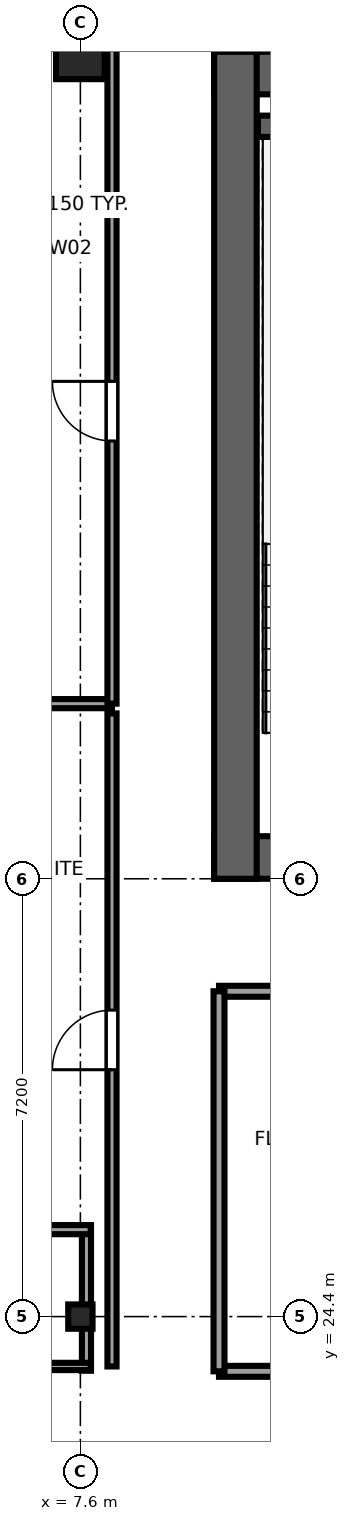
"""IFC4 building model, lengths in metres.
Left out: names, types, materials, properties, quantities, classifications, styles, units other than length and angle.
Written with IfcOpenShell. Run it as: python <this file> out.ifc"""

import sys

from ifc_helpers import new_model, si_unit, direction, frame, frame_2d, origin, origin_2d, place, context, subcontext, project, spatial, rectangle, i_section, extrude, source, transform, mapped, element, fill, save


model = new_model("IFC4")
c1 = context("Model", 3, precision=1e-05, world=origin(), true_north=direction((0.0, 1.0)))
c2 = subcontext(c1, "Body", "Model", "MODEL_VIEW")
j1 = project(units=[si_unit("LENGTHUNIT", "METRE"), si_unit("PLANEANGLEUNIT", "RADIAN")], contexts=[c1])
p1 = place(None, origin())
s1 = spatial("IfcSite", under=j1, at=p1, CompositionType="ELEMENT")
p2 = place(p1, origin())
s2 = spatial("IfcBuilding", under=s1, at=p2, CompositionType="ELEMENT")
p3 = place(p2, frame((0.0, 0.0, 150.6)))
s3 = spatial("IfcBuildingStorey", under=s2, at=p3, CompositionType="ELEMENT", Elevation=150.6)
p4 = place(p3, frame((9.8, 31.95, 0.0), z_axis=(0.0, 0.0, 1.0), x_axis=(1.0, 0.0, 0.0)))
e1 = element("IfcWall", 1, at=p4, inside=s3, PredefinedType="SHEAR", context=c2, shape_type="SweptSolid", body=[
    extrude(rectangle(XDim=26.4, YDim=0.7, at=frame_2d((13.2, 0.0))), origin(), (0.0, 0.0, 1.0), 3.55),
])
p5 = place(p4, frame((7.65, 0.0, 0.0), z_axis=(0.0, 0.0, 1.0), x_axis=(-1.0, 0.0, 0.0)))
e2 = element("IfcOpeningElement", 2, at=p5, cuts=e1, PredefinedType="OPENING", context=c2, shape_type="SweptSolid", body=[
    extrude(rectangle(XDim=1.5, YDim=2.04, at=frame_2d((0.75, 1.02))), frame((0.0, 0.36, 0.0), z_axis=(0.0, -1.0, 0.0), x_axis=(1.0, 0.0, 0.0)), (0.0, 0.0, 1.0), 0.72),
])
p6 = place(p4, frame((13.95, 0.0, 0.0), z_axis=(0.0, 0.0, 1.0), x_axis=(-1.0, 0.0, 0.0)))
e3 = element("IfcOpeningElement", 3, at=p6, cuts=e1, PredefinedType="OPENING", context=c2, shape_type="SweptSolid", body=[
    extrude(rectangle(XDim=1.5, YDim=2.04, at=frame_2d((0.75, 1.02))), frame((0.0, 0.36, 0.0), z_axis=(0.0, -1.0, 0.0), x_axis=(1.0, 0.0, 0.0)), (0.0, 0.0, 1.0), 0.72),
])
p7 = place(p4, frame((20.25, 0.0, 0.0), z_axis=(0.0, 0.0, 1.0), x_axis=(-1.0, 0.0, 0.0)))
e4 = element("IfcOpeningElement", 4, at=p7, cuts=e1, PredefinedType="OPENING", context=c2, shape_type="SweptSolid", body=[
    extrude(rectangle(XDim=1.5, YDim=2.04, at=frame_2d((0.75, 1.02))), frame((0.0, 0.36, 0.0), z_axis=(0.0, -1.0, 0.0), x_axis=(1.0, 0.0, 0.0)), (0.0, 0.0, 1.0), 0.72),
])
p8 = place(p3, frame((9.8, 44.85, 0.0), z_axis=(0.0, 0.0, 1.0), x_axis=(1.0, 0.0, 0.0)))
e5 = element("IfcWall", 5, at=p8, inside=s3, PredefinedType="SHEAR", context=c2, shape_type="SweptSolid", body=[
    extrude(rectangle(XDim=26.4, YDim=0.7, at=frame_2d((13.2, 0.0))), origin(), (0.0, 0.0, 1.0), 3.55),
])
p9 = place(p3, frame((10.15, 31.6, 0.0), z_axis=(0.0, 0.0, 1.0), x_axis=(0.0, 1.0, 0.0)))
e6 = element("IfcWall", 6, at=p9, inside=s3, PredefinedType="SHEAR", context=c2, shape_type="SweptSolid", body=[
    extrude(rectangle(XDim=13.6, YDim=0.7, at=frame_2d((6.8, 0.0))), origin(), (0.0, 0.0, 1.0), 3.55),
])
p10 = place(p3, frame((10.52, 43.975, 0.0), z_axis=(0.0, 0.0, 1.0), x_axis=(1.0, 0.0, 0.0)))
e7 = element("IfcWall", 7, at=p10, inside=s3, PredefinedType="SHEAR", context=c2, shape_type="SweptSolid", body=[
    extrude(rectangle(XDim=3.6, YDim=0.35, at=frame_2d((1.8, 0.0))), origin(), (0.0, 0.0, 1.0), 3.55),
])
m1 = source(origin(), c2, "Body", "SweptSolid", [
    extrude(i_section(OverallWidth=0.4, OverallDepth=0.4, WebThickness=0.02, FlangeThickness=0.035, at=origin_2d()), origin(), (0.0, 0.0, 1.0), 3.55),
])
p11 = place(p3, frame((7.6, 24.4, 0.0), z_axis=(0.0, 0.0, 1.0), x_axis=(1.0, 0.0, 0.0)))
e8 = element("IfcColumn", 8, at=p11, inside=s3, PredefinedType="COLUMN", context=c2, shape_type="MappedRepresentation", body=[
    mapped(m1, transform((0.0, 0.0, 0.0), x_axis=(1.0, 0.0, 0.0), y_axis=(0.0, 1.0, 0.0), z_axis=(0.0, 0.0, 1.0), scale=1.0)),
])
m2 = source(origin(), c2, "Body", "SweptSolid", [
    extrude(rectangle(XDim=0.8, YDim=0.8, at=origin_2d()), origin(), (0.0, 0.0, 1.0), 3.55),
])
p12 = place(p3, frame((7.6, 45.15, 0.0), z_axis=(0.0, 0.0, 1.0), x_axis=(1.0, 0.0, 0.0)))
e9 = element("IfcColumn", 9, at=p12, inside=s3, PredefinedType="COLUMN", context=c2, shape_type="MappedRepresentation", body=[
    mapped(m2, transform((0.0, 0.0, 0.0), x_axis=(1.0, 0.0, 0.0), y_axis=(0.0, 1.0, 0.0), z_axis=(0.0, 0.0, 1.0), scale=1.0)),
])
p13 = place(p3, frame((7.7, 23.51, 0.0), z_axis=(0.0, 0.0, 1.0), x_axis=(0.0, 1.0, 0.0)))
e10 = element("IfcWall", 10, at=p13, inside=s3, PredefinedType="PARTITIONING", context=c2, shape_type="SweptSolid", body=[
    extrude(rectangle(XDim=2.39, YDim=0.15, at=frame_2d((1.195, 0.0))), origin(), (0.0, 0.0, 1.0), 2.16),
])
p14 = place(p3, frame((5.48, 23.58, 0.0), z_axis=(0.0, 0.0, 1.0), x_axis=(1.0, 0.0, 0.0)))
e11 = element("IfcWall", 11, at=p14, inside=s3, PredefinedType="PLUMBINGWALL", context=c2, shape_type="SweptSolid", body=[
    extrude(rectangle(XDim=2.29, YDim=0.12, at=frame_2d((1.145, 0.0))), origin(), (0.0, 0.0, 1.0), 3.37),
])
p15 = place(p3, frame((5.48, 25.83, 0.0), z_axis=(0.0, 0.0, 1.0), x_axis=(1.0, 0.0, 0.0)))
e12 = element("IfcWall", 12, at=p15, inside=s3, PredefinedType="PARTITIONING", context=c2, shape_type="SweptSolid", body=[
    extrude(rectangle(XDim=2.29, YDim=0.15, at=frame_2d((1.145, 0.0))), origin(), (0.0, 0.0, 1.0), 3.37),
])
p16 = place(p15, frame((0.685, 0.0, 0.0)))
e13 = element("IfcOpeningElement", 13, at=p16, cuts=e12, PredefinedType="OPENING", context=c2, shape_type="SweptSolid", body=[
    extrude(rectangle(XDim=0.92, YDim=2.01, at=frame_2d((0.46, 1.005))), frame((0.0, 0.085, 0.0), z_axis=(0.0, -1.0, 0.0), x_axis=(1.0, 0.0, 0.0)), (0.0, 0.0, 1.0), 0.17),
])
p17 = place(p3, frame((3.005, 34.48, 0.0), z_axis=(0.0, 0.0, 1.0), x_axis=(1.0, 0.0, 0.0)))
e14 = element("IfcWall", 14, at=p17, inside=s3, PredefinedType="PARTITIONING", context=c2, shape_type="SweptSolid", body=[
    extrude(rectangle(XDim=5.115, YDim=0.15, at=frame_2d((2.558, 0.0))), origin(), (0.0, 0.0, 1.0), 3.37),
])
p18 = place(p3, frame((8.12, 23.58, 0.0), z_axis=(0.0, 0.0, 1.0), x_axis=(0.0, 1.0, 0.0)))
e15 = element("IfcWall", 15, at=p18, inside=s3, PredefinedType="PARTITIONING", context=c2, shape_type="SweptSolid", body=[
    extrude(rectangle(XDim=10.74, YDim=0.15, at=frame_2d((5.37, 0.0))), origin(), (0.0, 0.0, 1.0), 3.37),
])
p19 = place(p18, frame((4.88, 0.0, 0.0)))
e16 = element("IfcOpeningElement", 16, at=p19, cuts=e15, PredefinedType="OPENING", context=c2, shape_type="SweptSolid", body=[
    extrude(rectangle(XDim=0.98, YDim=2.12, at=frame_2d((0.49, 1.06))), frame((0.0, 0.085, 0.0), z_axis=(0.0, -1.0, 0.0), x_axis=(1.0, 0.0, 0.0)), (0.0, 0.0, 1.0), 0.17),
])
p20 = place(p3, frame((8.12, 34.48, 0.0), z_axis=(0.0, 0.0, 1.0), x_axis=(0.0, 1.0, 0.0)))
e17 = element("IfcWall", 17, at=p20, inside=s3, PredefinedType="PARTITIONING", context=c2, shape_type="SweptSolid", body=[
    extrude(rectangle(XDim=11.115, YDim=0.15, at=frame_2d((5.558, 0.0))), origin(), (0.0, 0.0, 1.0), 3.37),
])
p21 = place(p20, frame((4.32, 0.0, 0.0)))
e18 = element("IfcOpeningElement", 18, at=p21, cuts=e17, PredefinedType="OPENING", context=c2, shape_type="SweptSolid", body=[
    extrude(rectangle(XDim=0.98, YDim=2.12, at=frame_2d((0.49, 1.06))), frame((0.0, 0.085, 0.0), z_axis=(0.0, -1.0, 0.0), x_axis=(1.0, 0.0, 0.0)), (0.0, 0.0, 1.0), 0.17),
])
p22 = place(p3, frame((9.88, 23.5, 0.0), z_axis=(0.0, 0.0, 1.0), x_axis=(1.0, 0.0, 0.0)))
e19 = element("IfcWall", 19, at=p22, inside=s3, PredefinedType="PARTITIONING", context=c2, shape_type="SweptSolid", body=[
    extrude(rectangle(XDim=4.22, YDim=0.18, at=frame_2d((2.11, 0.0))), origin(), (0.0, 0.0, 1.0), 3.37),
])
p23 = place(p22, frame((1.285, 0.0, 0.0)))
e20 = element("IfcOpeningElement", 20, at=p23, cuts=e19, PredefinedType="OPENING", context=c2, shape_type="SweptSolid", body=[
    extrude(rectangle(XDim=1.65, YDim=2.15, at=frame_2d((0.825, 1.075))), frame((0.0, 0.1, 0.0), z_axis=(0.0, -1.0, 0.0), x_axis=(1.0, 0.0, 0.0)), (0.0, 0.0, 1.0), 0.2),
])
p24 = place(p3, frame((9.88, 29.75, 0.0), z_axis=(0.0, 0.0, 1.0), x_axis=(1.0, 0.0, 0.0)))
e21 = element("IfcWall", 21, at=p24, inside=s3, PredefinedType="PARTITIONING", context=c2, shape_type="SweptSolid", body=[
    extrude(rectangle(XDim=4.22, YDim=0.18, at=frame_2d((2.11, 0.0))), origin(), (0.0, 0.0, 1.0), 3.37),
])
p25 = place(p3, frame((9.88, 23.5, 0.0), z_axis=(0.0, 0.0, 1.0), x_axis=(0.0, 1.0, 0.0)))
e22 = element("IfcWall", 22, at=p25, inside=s3, PredefinedType="PARTITIONING", context=c2, shape_type="SweptSolid", body=[
    extrude(rectangle(XDim=6.25, YDim=0.18, at=frame_2d((3.125, 0.0))), origin(), (0.0, 0.0, 1.0), 3.37),
])
m3 = source(origin(), c2, "Body", "SweptSolid", [
    extrude(rectangle(XDim=0.98, YDim=2.12, at=frame_2d((0.49, 1.06))), frame((0.0, 0.025, 0.0), z_axis=(0.0, -1.0, 0.0), x_axis=(1.0, 0.0, 0.0)), (0.0, 0.0, 1.0), 0.05),
])
p26 = place(p19, origin())
e23 = element("IfcDoor", 23, at=p26, inside=s3, OperationType="SINGLE_SWING_LEFT", PredefinedType="DOOR", context=c2, shape_type="MappedRepresentation", body=[
    mapped(m3, transform((0.0, 0.0, 0.0), x_axis=(1.0, 0.0, 0.0), y_axis=(0.0, 1.0, 0.0), z_axis=(0.0, 0.0, 1.0), scale=1.0)),
])
fill(e16, e23)
p27 = place(p21, origin())
e24 = element("IfcDoor", 24, at=p27, inside=s3, OperationType="SINGLE_SWING_RIGHT", PredefinedType="DOOR", context=c2, shape_type="MappedRepresentation", body=[
    mapped(m3, transform((0.0, 0.0, 0.0), x_axis=(1.0, 0.0, 0.0), y_axis=(0.0, 1.0, 0.0), z_axis=(0.0, 0.0, 1.0), scale=1.0)),
])
fill(e18, e24)
save(model, sys.argv[1])
